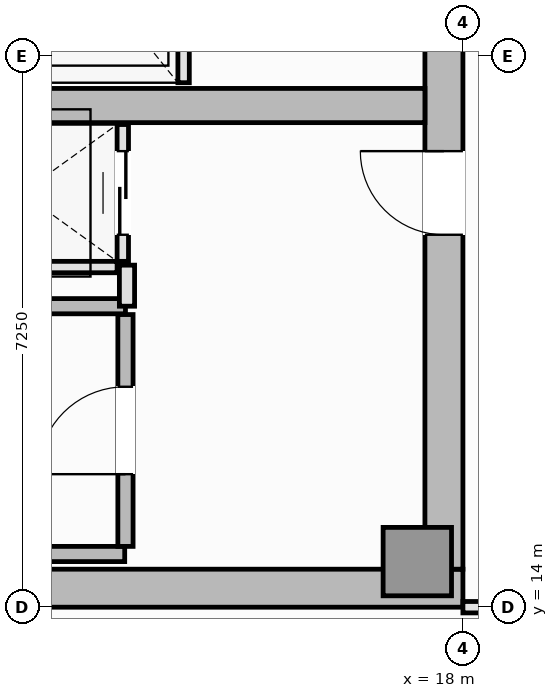
"""IFC4 building model, lengths in metres.
Left out: names, types, materials, properties, quantities, classifications, styles, units other than length and angle.
Written with IfcOpenShell. Run it as: python <this file> out.ifc"""

import sys

from ifc_helpers import new_model, si_unit, direction, frame, frame_2d, origin, origin_2d, place, context, subcontext, project, spatial, rectangle, extrude, element, fill, save


model = new_model("IFC4")
c1 = context("Model", 3, precision=1e-05, world=origin(), true_north=direction((0.0, 1.0)))
c2 = subcontext(c1, "Body", "Model", "MODEL_VIEW")
j1 = project(units=[si_unit("LENGTHUNIT", "METRE"), si_unit("PLANEANGLEUNIT", "RADIAN")], contexts=[c1])
p1 = place(None, origin())
s1 = spatial("IfcSite", under=j1, at=p1, CompositionType="ELEMENT")
p2 = place(p1, origin())
s2 = spatial("IfcBuilding", under=s1, at=p2, CompositionType="ELEMENT")
p3 = place(p2, frame((0.0, 0.0, 259.9)))
s3 = spatial("IfcBuildingStorey", under=s2, at=p3, CompositionType="ELEMENT", Elevation=259.9)
p4 = place(p3, frame((4.5, 14.25, 0.0), z_axis=(0.0, 0.0, 1.0), x_axis=(1.0, 0.0, 0.0)))
e1 = element("IfcWall", 1, at=p4, inside=s3, PredefinedType="SHEAR", context=c2, shape_type="SweptSolid", body=[
    extrude(rectangle(XDim=13.5, YDim=0.5, at=frame_2d((6.75, 0.0))), origin(), (0.0, 0.0, 1.0), 3.55),
])
p5 = place(p3, frame((17.75, 14.5, 0.0), z_axis=(0.0, 0.0, 1.0), x_axis=(0.0, 1.0, 0.0)))
e2 = element("IfcWall", 2, at=p5, inside=s3, PredefinedType="SHEAR", context=c2, shape_type="SweptSolid", body=[
    extrude(rectangle(XDim=8.95, YDim=0.5, at=frame_2d((4.475, 0.0))), origin(), (0.0, 0.0, 1.0), 3.55),
])
p6 = place(p5, frame((4.4, 0.0, 0.0)))
e3 = element("IfcOpeningElement", 3, at=p6, cuts=e2, PredefinedType="OPENING", context=c2, shape_type="SweptSolid", body=[
    extrude(rectangle(XDim=1.1, YDim=2.15, at=frame_2d((0.55, 1.075))), frame((0.0, 0.26, 0.0), z_axis=(0.0, -1.0, 0.0), x_axis=(1.0, 0.0, 0.0)), (0.0, 0.0, 1.0), 0.52),
])
p7 = place(p3, frame((5.0, 20.6, 0.0), z_axis=(0.0, 0.0, 1.0), x_axis=(1.0, 0.0, 0.0)))
e4 = element("IfcWall", 4, at=p7, inside=s3, PredefinedType="SHEAR", context=c2, shape_type="SweptSolid", body=[
    extrude(rectangle(XDim=12.5, YDim=0.45, at=frame_2d((6.25, 0.0))), origin(), (0.0, 0.0, 1.0), 3.55),
])
p8 = place(p3, frame((17.4, 14.6, 0.0), z_axis=(0.0, 0.0, 1.0), x_axis=(1.0, 0.0, 0.0)))
e5 = element("IfcColumn", 5, at=p8, inside=s3, PredefinedType="PILASTER", context=c2, shape_type="SweptSolid", body=[
    extrude(rectangle(XDim=0.9, YDim=0.9, at=origin_2d()), origin(), (0.0, 0.0, 1.0), 3.55),
])
p9 = place(p3, frame((5.8, 14.7, 0.0), z_axis=(0.0, 0.0, 1.0), x_axis=(1.0, 0.0, 0.0)))
e6 = element("IfcWall", 6, at=p9, inside=s3, PredefinedType="SOLIDWALL", context=c2, shape_type="SweptSolid", body=[
    extrude(rectangle(XDim=7.75, YDim=0.2, at=frame_2d((3.875, 0.0))), origin(), (0.0, 0.0, 1.0), 3.55),
])
p10 = place(p3, frame((5.9, 17.96, 0.0), z_axis=(0.0, 0.0, 1.0), x_axis=(1.0, 0.0, 0.0)))
e7 = element("IfcWall", 7, at=p10, inside=s3, PredefinedType="SOLIDWALL", context=c2, shape_type="SweptSolid", body=[
    extrude(rectangle(XDim=7.66, YDim=0.2, at=frame_2d((3.83, 0.0))), origin(), (0.0, 0.0, 1.0), 3.55),
])
p11 = place(p3, frame((13.56, 14.8, 0.0), z_axis=(0.0, 0.0, 1.0), x_axis=(0.0, 1.0, 0.0)))
e8 = element("IfcWall", 8, at=p11, inside=s3, PredefinedType="SOLIDWALL", context=c2, shape_type="SweptSolid", body=[
    extrude(rectangle(XDim=3.05, YDim=0.2, at=frame_2d((1.525, 0.0))), origin(), (0.0, 0.0, 1.0), 3.55),
])
p12 = place(p11, frame((0.95, 0.0, 0.0)))
e9 = element("IfcOpeningElement", 9, at=p12, cuts=e8, PredefinedType="OPENING", context=c2, shape_type="SweptSolid", body=[
    extrude(rectangle(XDim=1.15, YDim=2.15, at=frame_2d((0.575, 1.075))), frame((0.0, 0.11, 0.0), z_axis=(0.0, -1.0, 0.0), x_axis=(1.0, 0.0, 0.0)), (0.0, 0.0, 1.0), 0.22),
])
p13 = place(p3, frame((14.325, 20.9, 0.0), z_axis=(0.0, 0.0, 1.0), x_axis=(0.0, 1.0, 0.0)))
e10 = element("IfcWall", 10, at=p13, inside=s3, PredefinedType="PARTITIONING", context=c2, shape_type="SweptSolid", body=[
    extrude(rectangle(XDim=2.55, YDim=0.15, at=frame_2d((1.275, 0.0))), origin(), (0.0, 0.0, 1.0), 3.39),
])
p14 = place(p3, frame((10.95, 18.475, 0.0), z_axis=(0.0, 0.0, 1.0), x_axis=(1.0, 0.0, 0.0)))
e11 = element("IfcWall", 11, at=p14, inside=s3, PredefinedType="PARTITIONING", context=c2, shape_type="SweptSolid", body=[
    extrude(rectangle(XDim=2.5, YDim=0.15, at=frame_2d((1.25, 0.0))), origin(), (0.0, 0.0, 1.0), 3.39),
])
p15 = place(p3, frame((13.525, 18.55, 0.0), z_axis=(0.0, 0.0, 1.0), x_axis=(0.0, 1.0, 0.0)))
e12 = element("IfcWall", 12, at=p15, inside=s3, PredefinedType="PARTITIONING", context=c2, shape_type="SweptSolid", body=[
    extrude(rectangle(XDim=1.8, YDim=0.15, at=frame_2d((0.9, 0.0))), origin(), (0.0, 0.0, 1.0), 3.39),
])
p16 = place(p15, frame((0.35, 0.0, 0.0)))
e13 = element("IfcOpeningElement", 13, at=p16, cuts=e12, PredefinedType="OPENING", context=c2, shape_type="SweptSolid", body=[
    extrude(rectangle(XDim=1.1, YDim=2.2, at=frame_2d((0.55, 1.1))), frame((0.0, 0.085, 0.0), z_axis=(0.0, -1.0, 0.0), x_axis=(1.0, 0.0, 0.0)), (0.0, 0.0, 1.0), 0.17),
])
p17 = place(p3, frame((13.58, 17.96, 0.0), z_axis=(0.0, 0.0, 1.0), x_axis=(0.0, 1.0, 0.0)))
e14 = element("IfcWall", 14, at=p17, inside=s3, PredefinedType="PARTITIONING", context=c2, shape_type="SweptSolid", body=[
    extrude(rectangle(XDim=0.54, YDim=0.2, at=frame_2d((0.27, 0.0))), origin(), (0.0, 0.0, 1.0), 3.39),
])
p18 = place(p3, frame((18.0, 14.0, 0.0), z_axis=(0.0, 0.0, 1.0), x_axis=(1.0, 0.0, 0.0)))
e15 = element("IfcWall", 15, at=p18, inside=s3, PredefinedType="PARTITIONING", context=c2, shape_type="SweptSolid", body=[
    extrude(rectangle(XDim=1.9, YDim=0.15, at=frame_2d((0.95, 0.0))), origin(), (0.0, 0.0, 1.0), 3.39),
])
p19 = place(p18, frame((0.5, 0.0, 0.0)))
e16 = element("IfcOpeningElement", 16, at=p19, cuts=e15, PredefinedType="OPENING", context=c2, shape_type="SweptSolid", body=[
    extrude(rectangle(XDim=0.9, YDim=2.1, at=frame_2d((0.45, 1.05))), frame((0.0, 0.085, 0.0), z_axis=(0.0, -1.0, 0.0), x_axis=(1.0, 0.0, 0.0)), (0.0, 0.0, 1.0), 0.17),
])
p20 = place(p12, origin())
e17 = element("IfcDoor", 17, at=p20, inside=s3, OperationType="SINGLE_SWING_LEFT", PredefinedType="DOOR", context=c2, shape_type="SweptSolid", body=[
    extrude(rectangle(XDim=1.15, YDim=2.15, at=frame_2d((0.575, 1.075))), frame((0.0, 0.025, 0.0), z_axis=(0.0, -1.0, 0.0), x_axis=(1.0, 0.0, 0.0)), (0.0, 0.0, 1.0), 0.05),
])
fill(e9, e17)
p21 = place(p16, origin())
e18 = element("IfcDoor", 18, at=p21, inside=s3, OperationType="DOUBLE_DOOR_SLIDING", PredefinedType="DOOR", context=c2, shape_type="SweptSolid", body=[
    extrude(rectangle(XDim=1.1, YDim=2.2, at=frame_2d((0.55, 1.1))), frame((0.0, 0.025, 0.0), z_axis=(0.0, -1.0, 0.0), x_axis=(1.0, 0.0, 0.0)), (0.0, 0.0, 1.0), 0.05),
])
fill(e13, e18)
p22 = place(p6, origin())
e19 = element("IfcDoor", 19, at=p22, inside=s3, OperationType="SINGLE_SWING_RIGHT", PredefinedType="DOOR", context=c2, shape_type="SweptSolid", body=[
    extrude(rectangle(XDim=1.1, YDim=2.15, at=frame_2d((0.55, 1.075))), frame((0.0, 0.025, 0.0), z_axis=(0.0, -1.0, 0.0), x_axis=(1.0, 0.0, 0.0)), (0.0, 0.0, 1.0), 0.05),
])
fill(e3, e19)
save(model, sys.argv[1])
